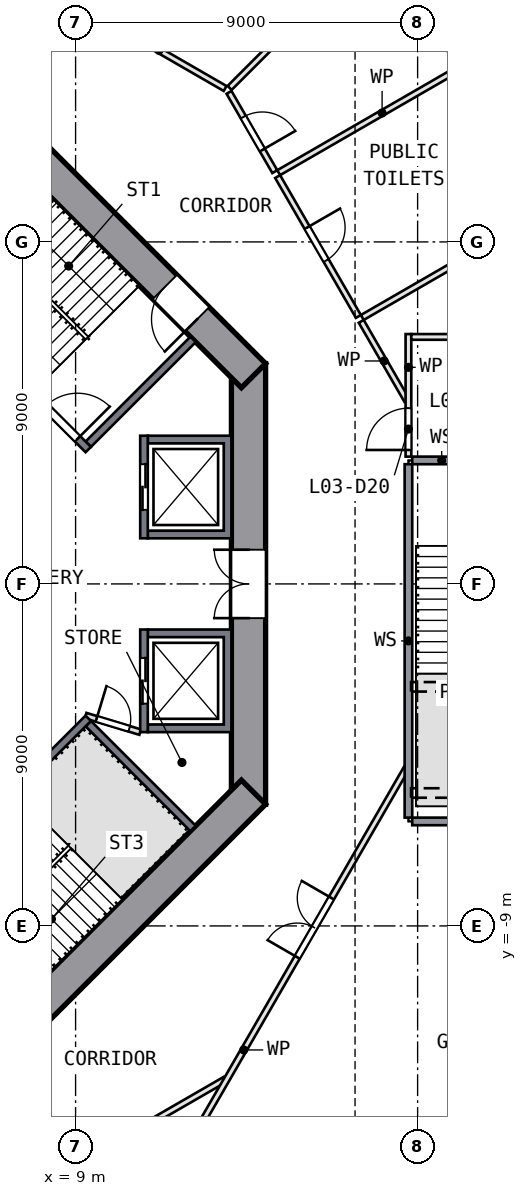
"""IFC4 building model, lengths in metres.
Left out: names, types, materials, properties, quantities, classifications, styles, units other than length and angle.
Written with IfcOpenShell. Run it as: python <this file> out.ifc"""

import sys

from ifc_helpers import new_model, si_unit, direction, frame, frame_2d, origin, place, context, subcontext, project, spatial, polyline, rectangle, outline, extrude, element, fill, save


model = new_model("IFC4")
c1 = context("Model", 3, precision=1e-05, world=origin(), true_north=direction((0.0, 1.0)))
c2 = subcontext(c1, "Body", "Model", "MODEL_VIEW")
j1 = project(units=[si_unit("LENGTHUNIT", "METRE"), si_unit("PLANEANGLEUNIT", "RADIAN")], contexts=[c1])
p1 = place(None, origin())
s1 = spatial("IfcSite", under=j1, at=p1, CompositionType="ELEMENT")
p2 = place(p1, origin())
s2 = spatial("IfcBuilding", under=s1, at=p2, CompositionType="ELEMENT")
p3 = place(p2, frame((0.0, 0.0, 19.0)))
s3 = spatial("IfcBuildingStorey", under=s2, at=p3, CompositionType="ELEMENT", Elevation=19.0)
p4 = place(p3, frame((13.55, -5.799, 0.0), z_axis=(0.0, 0.0, 1.0), x_axis=(0.0, 1.0, 0.0)))
e1 = element("IfcWall", 1, at=p4, inside=s3, PredefinedType="SHEAR", context=c2, shape_type="SweptSolid", body=[
    extrude(rectangle(XDim=11.598, YDim=0.9, at=frame_2d((5.799, 0.0))), origin(), (0.0, 0.0, 1.0), 4.5),
])
p5 = place(p4, frame((4.899, 0.0, 0.0)))
e2 = element("IfcOpeningElement", 2, at=p5, cuts=e1, PredefinedType="OPENING", context=c2, shape_type="SweptSolid", body=[
    extrude(rectangle(XDim=1.8, YDim=2.1, at=frame_2d((0.9, 1.05))), frame((0.0, 0.46, 0.0), z_axis=(0.0, -1.0, 0.0), x_axis=(1.0, 0.0, 0.0)), (0.0, 0.0, 1.0), 0.92),
])
p6 = place(p3, frame((13.682, 5.481, 0.0), z_axis=(0.0, 0.0, 1.0), x_axis=(-0.707106781, 0.707106781, 0.0)))
e3 = element("IfcWall", 3, at=p6, inside=s3, PredefinedType="SHEAR", context=c2, shape_type="SweptSolid", body=[
    extrude(rectangle(XDim=11.598, YDim=0.9, at=frame_2d((5.799, 0.0))), origin(), (0.0, 0.0, 1.0), 4.5),
])
p7 = place(p6, frame((2.099, 0.0, 0.0)))
e4 = element("IfcOpeningElement", 4, at=p7, cuts=e3, PredefinedType="OPENING", context=c2, shape_type="SweptSolid", body=[
    extrude(rectangle(XDim=1.2, YDim=2.1, at=frame_2d((0.6, 1.05))), frame((0.0, 0.46, 0.0), z_axis=(0.0, -1.0, 0.0), x_axis=(1.0, 0.0, 0.0)), (0.0, 0.0, 1.0), 0.92),
])
p8 = place(p3, frame((5.481, -13.682, 0.0), z_axis=(0.0, 0.0, 1.0), x_axis=(0.707106781, 0.707106781, 0.0)))
e5 = element("IfcWall", 5, at=p8, inside=s3, PredefinedType="SHEAR", context=c2, shape_type="SweptSolid", body=[
    extrude(rectangle(XDim=11.598, YDim=0.9, at=frame_2d((5.799, 0.0))), origin(), (0.0, 0.0, 1.0), 4.5),
])
p9 = place(p8, frame((2.099, 0.0, 0.0)))
e6 = element("IfcOpeningElement", 6, at=p9, cuts=e5, PredefinedType="OPENING", context=c2, shape_type="SweptSolid", body=[
    extrude(rectangle(XDim=1.2, YDim=2.1, at=frame_2d((0.6, 1.05))), frame((0.0, 0.46, 0.0), z_axis=(0.0, -1.0, 0.0), x_axis=(1.0, 0.0, 0.0)), (0.0, 0.0, 1.0), 0.92),
])
p10 = place(p3, frame((24.118, 6.603, 0.0), z_axis=(0.0, 0.0, 1.0), x_axis=(-0.499997984, 0.866026568, 0.0)))
e7 = element("IfcWall", 7, at=p10, inside=s3, PredefinedType="SOLIDWALL", context=c2, shape_type="SweptSolid", body=[
    extrude(rectangle(XDim=12.962, YDim=0.14, at=frame_2d((6.481, 0.0))), origin(), (0.0, 0.0, 1.0), 4.05),
])
p11 = place(p3, origin())
e8 = element("IfcWall", 8, at=p11, inside=s3, PredefinedType="SOLIDWALL", context=c2, shape_type="SweptSolid", body=[
    extrude(outline(polyline([(13.1, -3.9), (10.9, -3.9), (10.9, -3.7), (12.9, -3.7), (12.9, -1.4), (10.9, -1.4), (10.9, -1.2), (13.1, -1.2), (13.1, -3.9)])), origin(), (0.0, 0.0, 1.0), 4.05),
])
p12 = place(p3, frame((10.8, -1.2, 0.0), z_axis=(0.0, 0.0, 1.0), x_axis=(0.0, -1.0, 0.0)))
e9 = element("IfcWall", 9, at=p12, inside=s3, PredefinedType="SOLIDWALL", context=c2, shape_type="SweptSolid", body=[
    extrude(rectangle(XDim=2.7, YDim=0.2, at=frame_2d((1.35, 0.0))), origin(), (0.0, 0.0, 1.0), 4.05),
])
p13 = place(p12, frame((0.75, 0.0, 0.0)))
e10 = element("IfcOpeningElement", 10, at=p13, cuts=e9, PredefinedType="OPENING", context=c2, shape_type="SweptSolid", body=[
    extrude(rectangle(XDim=1.2, YDim=2.1, at=frame_2d((0.6, 1.05))), frame((0.0, 0.11, 0.0), z_axis=(0.0, -1.0, 0.0), x_axis=(1.0, 0.0, 0.0)), (0.0, 0.0, 1.0), 0.22),
])
p14 = place(p3, origin())
e11 = element("IfcWall", 11, at=p14, inside=s3, PredefinedType="SOLIDWALL", context=c2, shape_type="SweptSolid", body=[
    extrude(outline(polyline([(13.1, 3.9), (13.1, 1.2), (10.9, 1.2), (10.9, 1.4), (12.9, 1.4), (12.9, 3.7), (10.9, 3.7), (10.9, 3.9), (13.1, 3.9)])), origin(), (0.0, 0.0, 1.0), 4.05),
])
p15 = place(p3, frame((10.8, 1.2, 0.0), z_axis=(0.0, 0.0, 1.0), x_axis=(0.0, 1.0, 0.0)))
e12 = element("IfcWall", 12, at=p15, inside=s3, PredefinedType="SOLIDWALL", context=c2, shape_type="SweptSolid", body=[
    extrude(rectangle(XDim=2.7, YDim=0.2, at=frame_2d((1.35, 0.0))), origin(), (0.0, 0.0, 1.0), 4.05),
])
p16 = place(p15, frame((0.75, 0.0, 0.0)))
e13 = element("IfcOpeningElement", 13, at=p16, cuts=e12, PredefinedType="OPENING", context=c2, shape_type="SweptSolid", body=[
    extrude(rectangle(XDim=1.2, YDim=2.1, at=frame_2d((0.6, 1.05))), frame((0.0, 0.11, 0.0), z_axis=(0.0, -1.0, 0.0), x_axis=(1.0, 0.0, 0.0)), (0.0, 0.0, 1.0), 0.22),
])
p17 = place(p3, frame((3.535, 9.334, 0.0), z_axis=(0.0, 0.0, 1.0), x_axis=(0.707106781, -0.707106781, 0.0)))
e14 = element("IfcWall", 14, at=p17, inside=s3, PredefinedType="SOLIDWALL", context=c2, shape_type="SweptSolid", body=[
    extrude(rectangle(XDim=8.2, YDim=0.2, at=frame_2d((4.1, 0.0))), origin(), (0.0, 0.0, 1.0), 4.05),
])
p18 = place(p17, frame((6.6, 0.0, 0.0)))
e15 = element("IfcOpeningElement", 15, at=p18, cuts=e14, PredefinedType="OPENING", context=c2, shape_type="SweptSolid", body=[
    extrude(rectangle(XDim=1.2, YDim=2.1, at=frame_2d((0.6, 1.05))), frame((0.0, 0.11, 0.0), z_axis=(0.0, -1.0, 0.0), x_axis=(1.0, 0.0, 0.0)), (0.0, 0.0, 1.0), 0.22),
])
p19 = place(p3, frame((9.334, 3.677, 0.0), z_axis=(0.0, 0.0, 1.0), x_axis=(0.707106781, 0.707106781, 0.0)))
e16 = element("IfcWall", 16, at=p19, inside=s3, PredefinedType="SOLIDWALL", context=c2, shape_type="SweptSolid", body=[
    extrude(rectangle(XDim=3.9, YDim=0.2, at=frame_2d((1.95, 0.0))), origin(), (0.0, 0.0, 1.0), 4.05),
])
p20 = place(p3, frame((9.334, -3.535, 0.0), z_axis=(0.0, 0.0, 1.0), x_axis=(-0.707106781, -0.707106781, 0.0)))
e17 = element("IfcWall", 17, at=p20, inside=s3, PredefinedType="SOLIDWALL", context=c2, shape_type="SweptSolid", body=[
    extrude(rectangle(XDim=8.2, YDim=0.2, at=frame_2d((4.1, 0.0))), origin(), (0.0, 0.0, 1.0), 4.05),
])
p21 = place(p20, frame((6.6, 0.0, 0.0)))
e18 = element("IfcOpeningElement", 18, at=p21, cuts=e17, PredefinedType="OPENING", context=c2, shape_type="SweptSolid", body=[
    extrude(rectangle(XDim=1.2, YDim=2.1, at=frame_2d((0.6, 1.05))), frame((0.0, 0.11, 0.0), z_axis=(0.0, -1.0, 0.0), x_axis=(1.0, 0.0, 0.0)), (0.0, 0.0, 1.0), 0.22),
])
p22 = place(p3, frame((9.334, -3.677, 0.0), z_axis=(0.0, 0.0, 1.0), x_axis=(0.707106781, -0.707106781, 0.0)))
e19 = element("IfcWall", 19, at=p22, inside=s3, PredefinedType="SOLIDWALL", context=c2, shape_type="SweptSolid", body=[
    extrude(rectangle(XDim=3.9, YDim=0.2, at=frame_2d((1.95, 0.0))), origin(), (0.0, 0.0, 1.0), 4.05),
])
p23 = place(p3, frame((9.263, -3.465, 0.0), z_axis=(0.0, 0.0, 1.0), x_axis=(0.957084567, -0.289808785, 0.0)))
e20 = element("IfcWall", 20, at=p23, inside=s3, PredefinedType="PARTITIONING", context=c2, shape_type="SweptSolid", body=[
    extrude(rectangle(XDim=1.501, YDim=0.15, at=frame_2d((0.75, 0.0))), origin(), (0.0, 0.0, 1.0), 4.05),
])
p24 = place(p23, frame((0.301, 0.0, 0.0)))
e21 = element("IfcOpeningElement", 21, at=p24, cuts=e20, PredefinedType="OPENING", context=c2, shape_type="SweptSolid", body=[
    extrude(rectangle(XDim=0.9, YDim=2.1, at=frame_2d((0.45, 1.05))), frame((0.0, 0.085, 0.0), z_axis=(0.0, -1.0, 0.0), x_axis=(1.0, 0.0, 0.0)), (0.0, 0.0, 1.0), 0.17),
])
p25 = place(p3, frame((4.823, 17.721, 0.0), z_axis=(0.0, 0.0, 1.0), x_axis=(0.866037142, -0.499979668, 0.0)))
e22 = element("IfcWall", 22, at=p25, inside=s3, PredefinedType="PARTITIONING", context=c2, shape_type="SweptSolid", body=[
    extrude(rectangle(XDim=9.367, YDim=0.15, at=frame_2d((4.683, 0.0))), origin(), (0.0, 0.0, 1.0), 4.05),
])
p26 = place(p25, frame((4.15, 0.0, 0.0)))
e23 = element("IfcOpeningElement", 23, at=p26, cuts=e22, PredefinedType="OPENING", context=c2, shape_type="SweptSolid", body=[
    extrude(rectangle(XDim=1.0, YDim=2.1, at=frame_2d((0.5, 1.05))), frame((0.0, 0.085, 0.0), z_axis=(0.0, -1.0, 0.0), x_axis=(1.0, 0.0, 0.0)), (0.0, 0.0, 1.0), 0.17),
])
p27 = place(p3, frame((12.935, -13.038, 0.0), z_axis=(0.0, 0.0, 1.0), x_axis=(-0.866037142, -0.499979668, 0.0)))
e24 = element("IfcWall", 24, at=p27, inside=s3, PredefinedType="PARTITIONING", context=c2, shape_type="SweptSolid", body=[
    extrude(rectangle(XDim=9.367, YDim=0.15, at=frame_2d((4.683, 0.0))), origin(), (0.0, 0.0, 1.0), 4.05),
])
p28 = place(p3, frame((13.038, 12.935, 0.0), z_axis=(0.0, 0.0, 1.0), x_axis=(0.499933044, -0.866064057, 0.0)))
e25 = element("IfcWall", 25, at=p28, inside=s3, PredefinedType="PARTITIONING", context=c2, shape_type="SweptSolid", body=[
    extrude(rectangle(XDim=2.408, YDim=0.15, at=frame_2d((1.204, 0.0))), origin(), (0.0, 0.0, 1.0), 4.05),
])
p29 = place(p28, frame((0.75, 0.0, 0.0)))
e26 = element("IfcOpeningElement", 26, at=p29, cuts=e25, PredefinedType="OPENING", context=c2, shape_type="SweptSolid", body=[
    extrude(rectangle(XDim=1.0, YDim=2.1, at=frame_2d((0.5, 1.05))), frame((0.0, 0.085, 0.0), z_axis=(0.0, -1.0, 0.0), x_axis=(1.0, 0.0, 0.0)), (0.0, 0.0, 1.0), 0.17),
])
p30 = place(p3, frame((14.317, 10.719, 0.0), z_axis=(0.0, 0.0, 1.0), x_axis=(0.500037366, -0.866003829, 0.0)))
e27 = element("IfcWall", 27, at=p30, inside=s3, PredefinedType="PARTITIONING", context=c2, shape_type="SweptSolid", body=[
    extrude(rectangle(XDim=4.25, YDim=0.15, at=frame_2d((2.125, 0.0))), origin(), (0.0, 0.0, 1.0), 4.05),
])
p31 = place(p30, frame((1.55, 0.0, 0.0)))
e28 = element("IfcOpeningElement", 28, at=p31, cuts=e27, PredefinedType="OPENING", context=c2, shape_type="SweptSolid", body=[
    extrude(rectangle(XDim=1.0, YDim=2.1, at=frame_2d((0.5, 1.05))), frame((0.0, 0.085, 0.0), z_axis=(0.0, -1.0, 0.0), x_axis=(1.0, 0.0, 0.0)), (0.0, 0.0, 1.0), 0.17),
])
p32 = place(p3, frame((16.517, 6.909, 0.0), z_axis=(0.0, 0.0, 1.0), x_axis=(0.499933044, -0.866064057, 0.0)))
e29 = element("IfcWall", 29, at=p32, inside=s3, PredefinedType="PARTITIONING", context=c2, shape_type="SweptSolid", body=[
    extrude(rectangle(XDim=2.408, YDim=0.15, at=frame_2d((1.204, 0.0))), origin(), (0.0, 0.0, 1.0), 4.05),
])
p33 = place(p3, frame((17.858, -6.25, 0.0), z_axis=(0.0, 0.0, 1.0), x_axis=(1.0, 0.0, 0.0)))
e30 = element("IfcWall", 30, at=p33, inside=s3, PredefinedType="SOLIDWALL", context=c2, shape_type="SweptSolid", body=[
    extrude(rectangle(XDim=4.6, YDim=0.2, at=frame_2d((2.3, 0.0))), origin(), (0.0, 0.0, 1.0), 4.05),
])
p34 = place(p3, frame((12.117, -14.53, 0.0), z_axis=(0.0, 0.0, 1.0), x_axis=(0.500001509, 0.866024532, 0.0)))
e31 = element("IfcWall", 31, at=p34, inside=s3, PredefinedType="PARTITIONING", context=c2, shape_type="SweptSolid", body=[
    extrude(rectangle(XDim=11.183, YDim=0.15, at=frame_2d((5.592, 0.0))), origin(), (0.0, 0.0, 1.0), 4.05),
])
p35 = place(p34, frame((5.433, 0.0, 0.0)))
e32 = element("IfcOpeningElement", 32, at=p35, cuts=e31, PredefinedType="OPENING", context=c2, shape_type="SweptSolid", body=[
    extrude(rectangle(XDim=1.8, YDim=2.1, at=frame_2d((0.9, 1.05))), frame((0.0, 0.085, 0.0), z_axis=(0.0, -1.0, 0.0), x_axis=(1.0, 0.0, 0.0)), (0.0, 0.0, 1.0), 0.17),
])
p36 = place(p3, frame((17.758, 3.15, 0.0), z_axis=(0.0, 0.0, 1.0), x_axis=(0.0, -1.0, 0.0)))
e33 = element("IfcWall", 33, at=p36, inside=s3, PredefinedType="SOLIDWALL", context=c2, shape_type="SweptSolid", body=[
    extrude(rectangle(XDim=9.3, YDim=0.2, at=frame_2d((4.65, 0.0))), origin(), (0.0, 0.0, 1.0), 4.05),
])
p37 = place(p3, frame((17.758, 3.35, 0.0), z_axis=(0.0, 0.0, 1.0), x_axis=(0.0, 1.0, 0.0)))
e34 = element("IfcWall", 34, at=p37, inside=s3, PredefinedType="PARTITIONING", context=c2, shape_type="SweptSolid", body=[
    extrude(rectangle(XDim=3.225, YDim=0.15, at=frame_2d((1.613, 0.0))), origin(), (0.0, 0.0, 1.0), 4.05),
])
p38 = place(p37, frame((0.175, 0.0, 0.0)))
e35 = element("IfcOpeningElement", 35, at=p38, cuts=e34, PredefinedType="OPENING", context=c2, shape_type="SweptSolid", body=[
    extrude(rectangle(XDim=1.1, YDim=2.1, at=frame_2d((0.55, 1.05))), frame((0.0, 0.085, 0.0), z_axis=(0.0, -1.0, 0.0), x_axis=(1.0, 0.0, 0.0)), (0.0, 0.0, 1.0), 0.17),
])
p39 = place(p3, frame((17.7, 17.7, 0.0), z_axis=(0.0, 0.0, 1.0), x_axis=(-0.707106781, -0.707106781, 0.0)))
e36 = element("IfcWall", 36, at=p39, inside=s3, PredefinedType="PARTITIONING", context=c2, shape_type="SweptSolid", body=[
    extrude(rectangle(XDim=6.572, YDim=0.15, at=frame_2d((3.286, 0.0))), origin(), (0.0, 0.0, 1.0), 4.05),
])
p40 = place(p3, frame((19.787, 13.964, 0.0), z_axis=(0.0, 0.0, 1.0), x_axis=(-0.866042631, -0.49997016, 0.0)))
e37 = element("IfcWall", 37, at=p40, inside=s3, PredefinedType="PARTITIONING", context=c2, shape_type="SweptSolid", body=[
    extrude(rectangle(XDim=6.285, YDim=0.15, at=frame_2d((3.143, 0.0))), origin(), (0.0, 0.0, 1.0), 4.05),
])
p41 = place(p3, frame((21.987, 10.154, 0.0), z_axis=(0.0, 0.0, 1.0), x_axis=(-0.866032921, -0.49998698, 0.0)))
e38 = element("IfcWall", 38, at=p41, inside=s3, PredefinedType="PARTITIONING", context=c2, shape_type="SweptSolid", body=[
    extrude(rectangle(XDim=6.285, YDim=0.15, at=frame_2d((3.143, 0.0))), origin(), (0.0, 0.0, 1.0), 4.05),
])
p42 = place(p3, frame((17.858, 3.25, 0.0), z_axis=(0.0, 0.0, 1.0), x_axis=(1.0, 0.0, 0.0)))
e39 = element("IfcWall", 39, at=p42, inside=s3, PredefinedType="SOLIDWALL", context=c2, shape_type="SweptSolid", body=[
    extrude(rectangle(XDim=4.6, YDim=0.2, at=frame_2d((2.3, 0.0))), origin(), (0.0, 0.0, 1.0), 4.05),
])
p43 = place(p42, frame((1.75, 0.0, 0.0)))
e40 = element("IfcOpeningElement", 40, at=p43, cuts=e39, PredefinedType="OPENING", context=c2, shape_type="SweptSolid", body=[
    extrude(rectangle(XDim=1.1, YDim=2.1, at=frame_2d((0.55, 1.05))), frame((0.0, 0.11, 0.0), z_axis=(0.0, -1.0, 0.0), x_axis=(1.0, 0.0, 0.0)), (0.0, 0.0, 1.0), 0.22),
])
p44 = place(p3, frame((24.118, 6.5, 0.0), z_axis=(0.0, 0.0, 1.0), x_axis=(-1.0, 0.0, 0.0)))
e41 = element("IfcWall", 41, at=p44, inside=s3, PredefinedType="PARTITIONING", context=c2, shape_type="SweptSolid", body=[
    extrude(rectangle(XDim=6.285, YDim=0.15, at=frame_2d((3.143, 0.0))), origin(), (0.0, 0.0, 1.0), 4.05),
])
p45 = place(p44, frame((2.55, 0.0, 0.0)))
e42 = element("IfcOpeningElement", 42, at=p45, cuts=e41, PredefinedType="OPENING", context=c2, shape_type="SweptSolid", body=[
    extrude(rectangle(XDim=1.0, YDim=2.1, at=frame_2d((0.5, 1.05))), frame((0.0, 0.085, 0.0), z_axis=(0.0, -1.0, 0.0), x_axis=(1.0, 0.0, 0.0)), (0.0, 0.0, 1.0), 0.17),
])
p46 = place(p44, frame((3.95, 0.0, 0.0)))
e43 = element("IfcOpeningElement", 43, at=p46, cuts=e41, PredefinedType="OPENING", context=c2, shape_type="SweptSolid", body=[
    extrude(rectangle(XDim=1.0, YDim=2.1, at=frame_2d((0.5, 1.05))), frame((0.0, 0.085, 0.0), z_axis=(0.0, -1.0, 0.0), x_axis=(1.0, 0.0, 0.0)), (0.0, 0.0, 1.0), 0.17),
])
p47 = place(p13, origin())
e44 = element("IfcDoor", 44, at=p47, inside=s3, OperationType="DOUBLE_DOOR_SLIDING", PredefinedType="DOOR", context=c2, shape_type="SweptSolid", body=[
    extrude(rectangle(XDim=1.2, YDim=2.1, at=frame_2d((0.6, 1.05))), frame((0.0, 0.025, 0.0), z_axis=(0.0, -1.0, 0.0), x_axis=(1.0, 0.0, 0.0)), (0.0, 0.0, 1.0), 0.05),
])
fill(e10, e44)
p48 = place(p16, origin())
e45 = element("IfcDoor", 45, at=p48, inside=s3, OperationType="DOUBLE_DOOR_SLIDING", PredefinedType="DOOR", context=c2, shape_type="SweptSolid", body=[
    extrude(rectangle(XDim=1.2, YDim=2.1, at=frame_2d((0.6, 1.05))), frame((0.0, 0.025, 0.0), z_axis=(0.0, -1.0, 0.0), x_axis=(1.0, 0.0, 0.0)), (0.0, 0.0, 1.0), 0.05),
])
fill(e13, e45)
p49 = place(p18, origin())
e46 = element("IfcDoor", 46, at=p49, inside=s3, OperationType="SINGLE_SWING_RIGHT", PredefinedType="DOOR", context=c2, shape_type="SweptSolid", body=[
    extrude(rectangle(XDim=1.2, YDim=2.1, at=frame_2d((0.6, 1.05))), frame((0.0, 0.025, 0.0), z_axis=(0.0, -1.0, 0.0), x_axis=(1.0, 0.0, 0.0)), (0.0, 0.0, 1.0), 0.05),
])
fill(e15, e46)
p50 = place(p5, origin())
e47 = element("IfcDoor", 47, at=p50, inside=s3, OperationType="DOUBLE_DOOR_SINGLE_SWING", PredefinedType="DOOR", context=c2, shape_type="SweptSolid", body=[
    extrude(rectangle(XDim=1.8, YDim=2.1, at=frame_2d((0.9, 1.05))), frame((0.0, 0.025, 0.0), z_axis=(0.0, -1.0, 0.0), x_axis=(1.0, 0.0, 0.0)), (0.0, 0.0, 1.0), 0.05),
])
fill(e2, e47)
p51 = place(p7, origin())
e48 = element("IfcDoor", 48, at=p51, inside=s3, OperationType="SINGLE_SWING_LEFT", PredefinedType="DOOR", context=c2, shape_type="SweptSolid", body=[
    extrude(rectangle(XDim=1.2, YDim=2.1, at=frame_2d((0.6, 1.05))), frame((0.0, 0.025, 0.0), z_axis=(0.0, -1.0, 0.0), x_axis=(1.0, 0.0, 0.0)), (0.0, 0.0, 1.0), 0.05),
])
fill(e4, e48)
p52 = place(p24, origin())
e49 = element("IfcDoor", 49, at=p52, inside=s3, OperationType="SINGLE_SWING_LEFT", PredefinedType="DOOR", context=c2, shape_type="SweptSolid", body=[
    extrude(rectangle(XDim=0.9, YDim=2.1, at=frame_2d((0.45, 1.05))), frame((0.0, 0.025, 0.0), z_axis=(0.0, -1.0, 0.0), x_axis=(1.0, 0.0, 0.0)), (0.0, 0.0, 1.0), 0.05),
])
fill(e21, e49)
p53 = place(p29, origin())
e50 = element("IfcDoor", 50, at=p53, inside=s3, OperationType="SINGLE_SWING_RIGHT", PredefinedType="DOOR", context=c2, shape_type="SweptSolid", body=[
    extrude(rectangle(XDim=1.0, YDim=2.1, at=frame_2d((0.5, 1.05))), frame((0.0, 0.025, 0.0), z_axis=(0.0, -1.0, 0.0), x_axis=(1.0, 0.0, 0.0)), (0.0, 0.0, 1.0), 0.05),
])
fill(e26, e50)
p54 = place(p31, origin())
e51 = element("IfcDoor", 51, at=p54, inside=s3, OperationType="SINGLE_SWING_LEFT", PredefinedType="DOOR", context=c2, shape_type="SweptSolid", body=[
    extrude(rectangle(XDim=1.0, YDim=2.1, at=frame_2d((0.5, 1.05))), frame((0.0, 0.025, 0.0), z_axis=(0.0, -1.0, 0.0), x_axis=(1.0, 0.0, 0.0)), (0.0, 0.0, 1.0), 0.05),
])
fill(e28, e51)
p55 = place(p35, origin())
e52 = element("IfcDoor", 52, at=p55, inside=s3, OperationType="DOUBLE_DOOR_SINGLE_SWING", PredefinedType="DOOR", context=c2, shape_type="SweptSolid", body=[
    extrude(rectangle(XDim=1.8, YDim=2.1, at=frame_2d((0.9, 1.05))), frame((0.0, 0.025, 0.0), z_axis=(0.0, -1.0, 0.0), x_axis=(1.0, 0.0, 0.0)), (0.0, 0.0, 1.0), 0.05),
])
fill(e32, e52)
p56 = place(p38, origin())
e53 = element("IfcDoor", 53, at=p56, inside=s3, OperationType="SINGLE_SWING_LEFT", PredefinedType="DOOR", context=c2, shape_type="SweptSolid", body=[
    extrude(rectangle(XDim=1.1, YDim=2.1, at=frame_2d((0.55, 1.05))), frame((0.0, 0.025, 0.0), z_axis=(0.0, -1.0, 0.0), x_axis=(1.0, 0.0, 0.0)), (0.0, 0.0, 1.0), 0.05),
])
fill(e35, e53)
save(model, sys.argv[1])
